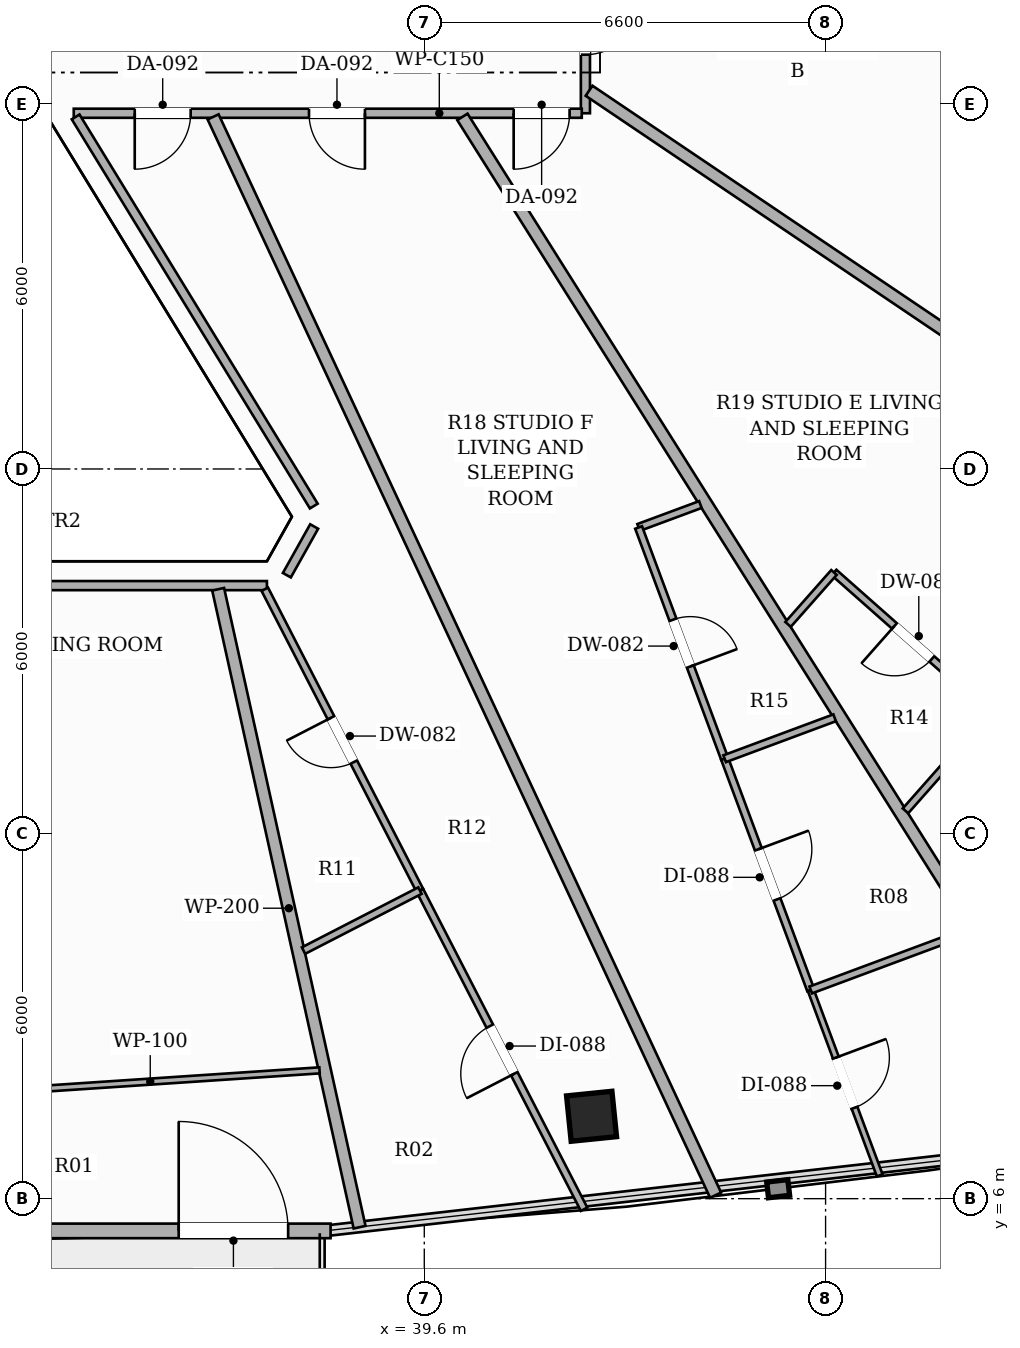
"""IFC4 building model, lengths in metres.
Left out: names, types, materials, properties, quantities, classifications, styles, units other than length and angle.
Written with IfcOpenShell. Run it as: python <this file> out.ifc"""

import sys

from ifc_helpers import new_model, si_unit, direction, frame, frame_2d, origin, origin_2d, place, context, subcontext, project, spatial, rectangle, hollow_rectangle, extrude, element, fill, save


model = new_model("IFC4")
c1 = context("Model", 3, precision=1e-05, world=origin(), true_north=direction((0.0, 1.0)))
c2 = subcontext(c1, "Body", "Model", "MODEL_VIEW")
j1 = project(units=[si_unit("LENGTHUNIT", "METRE"), si_unit("PLANEANGLEUNIT", "RADIAN")], contexts=[c1])
p1 = place(None, origin())
s1 = spatial("IfcSite", under=j1, at=p1, CompositionType="ELEMENT")
p2 = place(p1, origin())
s2 = spatial("IfcBuilding", under=s1, at=p2, CompositionType="ELEMENT")
p3 = place(p2, frame((0.0, 0.0, 253.55)))
s3 = spatial("IfcBuildingStorey", under=s2, at=p3, CompositionType="ELEMENT", Elevation=253.55)
p4 = place(p3, frame((42.351, 7.355, 0.0), z_axis=(0.0, 0.0, 1.0), x_axis=(0.994880708829, 0.101056297183, 0.0)))
e1 = element("IfcColumn", 1, at=p4, inside=s3, PredefinedType="COLUMN", context=c2, shape_type="SweptSolid", body=[
    extrude(hollow_rectangle(XDim=0.75, YDim=0.75, WallThickness=0.025, at=origin_2d()), origin(), (0.0, 0.0, 1.0), 3.3),
])
p5 = place(p3, frame((27.941, 5.47, 0.0), z_axis=(0.0, 0.0, 1.0), x_axis=(1.0, 0.0, 0.0)))
e2 = element("IfcWall", 2, at=p5, inside=s3, PredefinedType="SOLIDWALL", context=c2, shape_type="SweptSolid", body=[
    extrude(rectangle(XDim=10.118, YDim=0.24, at=frame_2d((5.059, 0.0))), origin(), (0.0, 0.0, 1.0), 2.464),
])
p6 = place(p5, frame((7.62, 0.0, 0.0)))
e3 = element("IfcOpeningElement", 3, at=p6, cuts=e2, PredefinedType="OPENING", context=c2, shape_type="SweptSolid", body=[
    extrude(rectangle(XDim=1.8, YDim=2.2, at=frame_2d((0.9, 1.1))), frame((0.0, 0.13, 0.0), z_axis=(0.0, -1.0, 0.0), x_axis=(1.0, 0.0, 0.0)), (0.0, 0.0, 1.0), 0.26),
])
p7 = place(p3, frame((49.146, 24.147, 0.0), z_axis=(0.0, 0.0, 1.0), x_axis=(-0.514275407092, 0.857625096216, 0.0)))
e4 = element("IfcWall", 4, at=p7, inside=s3, PredefinedType="SOLIDWALL", context=c2, shape_type="SweptSolid", body=[
    extrude(rectangle(XDim=9.777, YDim=0.24, at=frame_2d((4.889, 0.0))), origin(), (0.0, 0.0, 1.0), 2.464),
])
p8 = place(p7, frame((7.279, 0.0, 0.0)))
e5 = element("IfcOpeningElement", 5, at=p8, cuts=e4, PredefinedType="OPENING", context=c2, shape_type="SweptSolid", body=[
    extrude(rectangle(XDim=1.8, YDim=2.2, at=frame_2d((0.9, 1.1))), frame((0.0, 0.13, 0.0), z_axis=(0.0, -1.0, 0.0), x_axis=(1.0, 0.0, 0.0)), (0.0, 0.0, 1.0), 0.26),
])
p9 = place(p3, frame((42.25, 26.59, 0.0), z_axis=(0.0, 0.0, 1.0), x_axis=(0.0, -1.0, 0.0)))
e6 = element("IfcWall", 6, at=p9, inside=s3, PredefinedType="PARTITIONING", context=c2, shape_type="SweptSolid", body=[
    extrude(rectangle(XDim=2.74, YDim=0.15, at=frame_2d((1.37, 0.0))), origin(), (0.0, 0.0, 1.0), 2.613),
])
p10 = place(p9, frame((0.897, 0.0, 0.0)))
e7 = element("IfcOpeningElement", 7, at=p10, cuts=e6, PredefinedType="OPENING", context=c2, shape_type="SweptSolid", body=[
    extrude(rectangle(XDim=0.88, YDim=2.1, at=frame_2d((0.44, 1.05))), frame((0.0, 0.085, 0.0), z_axis=(0.0, -1.0, 0.0), x_axis=(1.0, 0.0, 0.0)), (0.0, 0.0, 1.0), 0.17),
])
p11 = place(p3, frame((42.19, 23.85, 0.0), z_axis=(0.0, 0.0, 1.0), x_axis=(-1.0, 0.0, 0.0)))
e8 = element("IfcWall", 8, at=p11, inside=s3, PredefinedType="PARTITIONING", context=c2, shape_type="SweptSolid", body=[
    extrude(rectangle(XDim=8.355, YDim=0.15, at=frame_2d((4.177, 0.0))), origin(), (0.0, 0.0, 1.0), 2.405),
])
p12 = place(p11, frame((0.2, 0.0, 0.0)))
e9 = element("IfcOpeningElement", 9, at=p12, cuts=e8, PredefinedType="OPENING", context=c2, shape_type="SweptSolid", body=[
    extrude(rectangle(XDim=0.92, YDim=2.15, at=frame_2d((0.46, 1.075))), frame((0.0, 0.085, 0.0), z_axis=(0.0, -1.0, 0.0), x_axis=(1.0, 0.0, 0.0)), (0.0, 0.0, 1.0), 0.17),
])
p13 = place(p11, frame((3.566, 0.0, 0.0)))
e10 = element("IfcOpeningElement", 10, at=p13, cuts=e8, PredefinedType="OPENING", context=c2, shape_type="SweptSolid", body=[
    extrude(rectangle(XDim=0.92, YDim=2.15, at=frame_2d((0.46, 1.075))), frame((0.0, 0.085, 0.0), z_axis=(0.0, -1.0, 0.0), x_axis=(1.0, 0.0, 0.0)), (0.0, 0.0, 1.0), 0.17),
])
p14 = place(p11, frame((6.432, 0.0, 0.0)))
e11 = element("IfcOpeningElement", 11, at=p14, cuts=e8, PredefinedType="OPENING", context=c2, shape_type="SweptSolid", body=[
    extrude(rectangle(XDim=0.92, YDim=2.15, at=frame_2d((0.46, 1.075))), frame((0.0, 0.085, 0.0), z_axis=(0.0, -1.0, 0.0), x_axis=(1.0, 0.0, 0.0)), (0.0, 0.0, 1.0), 0.17),
])
p15 = place(p3, frame((33.866, 23.79, 0.0), z_axis=(0.0, 0.0, 1.0), x_axis=(0.522011859837, -0.852938226479, 0.0)))
e12 = element("IfcWall", 12, at=p15, inside=s3, PredefinedType="PARTITIONING", context=c2, shape_type="SweptSolid", body=[
    extrude(rectangle(XDim=7.504, YDim=0.15, at=frame_2d((3.752, 0.0))), origin(), (0.0, 0.0, 1.0), 2.613),
])
p16 = place(p3, frame((37.789, 17.054, 0.0), z_axis=(0.0, 0.0, 1.0), x_axis=(-0.488935266506, -0.872320070368, 0.0)))
e13 = element("IfcWall", 13, at=p16, inside=s3, PredefinedType="PARTITIONING", context=c2, shape_type="SweptSolid", body=[
    extrude(rectangle(XDim=0.918, YDim=0.15, at=frame_2d((0.459, 0.0))), origin(), (0.0, 0.0, 1.0), 2.9),
])
p17 = place(p3, frame((37.012, 16.082, 0.0), z_axis=(0.0, 0.0, 1.0), x_axis=(-1.0, 0.0, 0.0)))
e14 = element("IfcWall", 14, at=p17, inside=s3, PredefinedType="PARTITIONING", context=c2, shape_type="SweptSolid", body=[
    extrude(rectangle(XDim=8.024, YDim=0.15, at=frame_2d((4.012, 0.0))), origin(), (0.0, 0.0, 1.0), 2.613),
])
p18 = place(p3, frame((36.21, 16.022, 0.0), z_axis=(0.0, 0.0, 1.0), x_axis=(0.216451711791, -0.976293325012, 0.0)))
e15 = element("IfcWall", 15, at=p18, inside=s3, PredefinedType="PARTITIONING", context=c2, shape_type="SweptSolid", body=[
    extrude(rectangle(XDim=10.746, YDim=0.2, at=frame_2d((5.373, 0.0))), origin(), (0.0, 0.0, 1.0), 2.332),
])
p19 = place(p3, frame((52.284, 17.493, 0.0), z_axis=(0.0, 0.0, 1.0), x_axis=(-0.829053532208, 0.559169241584, 0.0)))
e16 = element("IfcWall", 16, at=p19, inside=s3, PredefinedType="PARTITIONING", context=c2, shape_type="SweptSolid", body=[
    extrude(rectangle(XDim=12.031, YDim=0.2, at=frame_2d((6.015, 0.0))), origin(), (0.0, 0.0, 1.0), 2.332),
])
p20 = place(p3, frame((50.863, 6.899, 0.0), z_axis=(0.0, 0.0, 1.0), x_axis=(-0.532843438342, 0.846213844259, 0.0)))
e17 = element("IfcWall", 17, at=p20, inside=s3, PredefinedType="PARTITIONING", context=c2, shape_type="SweptSolid", body=[
    extrude(rectangle(XDim=19.961, YDim=0.2, at=frame_2d((9.98, 0.0))), origin(), (0.0, 0.0, 1.0), 2.332),
])
p21 = place(p3, frame((44.391, 6.058, 0.0), z_axis=(0.0, 0.0, 1.0), x_axis=(-0.422434507673, 0.906393450289, 0.0)))
e18 = element("IfcWall", 18, at=p21, inside=s3, PredefinedType="PARTITIONING", context=c2, shape_type="SweptSolid", body=[
    extrude(rectangle(XDim=19.563, YDim=0.2, at=frame_2d((9.782, 0.0))), origin(), (0.0, 0.0, 1.0), 2.332),
])
p22 = place(p3, frame((37.877, 8.11, 0.0), z_axis=(0.0, 0.0, 1.0), x_axis=(-0.997794804299, -0.066374155471, 0.0)))
e19 = element("IfcWall", 19, at=p22, inside=s3, PredefinedType="PARTITIONING", context=c2, shape_type="SweptSolid", body=[
    extrude(rectangle(XDim=10.851, YDim=0.1, at=frame_2d((5.425, 0.0))), origin(), (0.0, 0.0, 1.0), 2.332),
])
p23 = place(p22, frame((5.68, 0.0, 0.0)))
e20 = element("IfcOpeningElement", 20, at=p23, cuts=e19, PredefinedType="OPENING", context=c2, shape_type="SweptSolid", body=[
    extrude(rectangle(XDim=0.88, YDim=2.1, at=frame_2d((0.44, 1.05))), frame((0.0, 0.06, 0.0), z_axis=(0.0, -1.0, 0.0), x_axis=(1.0, 0.0, 0.0)), (0.0, 0.0, 1.0), 0.12),
])
p24 = place(p3, frame((48.943, 13.995, 0.0), z_axis=(0.0, 0.0, 1.0), x_axis=(-0.749231040751, 0.662308725275, 0.0)))
e21 = element("IfcWall", 21, at=p24, inside=s3, PredefinedType="PARTITIONING", context=c2, shape_type="SweptSolid", body=[
    extrude(rectangle(XDim=3.477, YDim=0.12, at=frame_2d((1.739, 0.0))), origin(), (0.0, 0.0, 1.0), 2.405),
])
p25 = place(p24, frame((1.329, 0.0, 0.0)))
e22 = element("IfcOpeningElement", 22, at=p25, cuts=e21, PredefinedType="OPENING", context=c2, shape_type="SweptSolid", body=[
    extrude(rectangle(XDim=0.82, YDim=2.1, at=frame_2d((0.41, 1.05))), frame((0.0, 0.07, 0.0), z_axis=(0.0, -1.0, 0.0), x_axis=(1.0, 0.0, 0.0)), (0.0, 0.0, 1.0), 0.14),
])
p26 = place(p3, frame((46.338, 16.298, 0.0), z_axis=(0.0, 0.0, 1.0), x_axis=(-0.662287293934, -0.749249985181, 0.0)))
e23 = element("IfcWall", 23, at=p26, inside=s3, PredefinedType="PARTITIONING", context=c2, shape_type="SweptSolid", body=[
    extrude(rectangle(XDim=1.14, YDim=0.12, at=frame_2d((0.57, 0.0))), origin(), (0.0, 0.0, 1.0), 2.9),
])
p27 = place(p3, frame((48.943, 13.995, 0.0), z_axis=(0.0, 0.0, 1.0), x_axis=(-0.662212567735, -0.749316031547, 0.0)))
e24 = element("IfcWall", 24, at=p27, inside=s3, PredefinedType="PARTITIONING", context=c2, shape_type="SweptSolid", body=[
    extrude(rectangle(XDim=2.158, YDim=0.12, at=frame_2d((1.079, 0.0))), origin(), (0.0, 0.0, 1.0), 2.405),
])
p28 = place(p3, frame((44.141, 17.415, 0.0), z_axis=(0.0, 0.0, 1.0), x_axis=(-0.937563848777, -0.347813210599, 0.0)))
e25 = element("IfcWall", 25, at=p28, inside=s3, PredefinedType="PARTITIONING", context=c2, shape_type="SweptSolid", body=[
    extrude(rectangle(XDim=1.084, YDim=0.12, at=frame_2d((0.542, 0.0))), origin(), (0.0, 0.0, 1.0), 2.613),
])
p29 = place(p3, frame((43.125, 17.038, 0.0), z_axis=(0.0, 0.0, 1.0), x_axis=(0.348728795746, -0.937223680355, 0.0)))
e26 = element("IfcWall", 26, at=p29, inside=s3, PredefinedType="PARTITIONING", context=c2, shape_type="SweptSolid", body=[
    extrude(rectangle(XDim=4.058, YDim=0.12, at=frame_2d((2.029, 0.0))), origin(), (0.0, 0.0, 1.0), 2.613),
])
p30 = place(p29, frame((1.619, 0.0, 0.0)))
e27 = element("IfcOpeningElement", 27, at=p30, cuts=e26, PredefinedType="OPENING", context=c2, shape_type="SweptSolid", body=[
    extrude(rectangle(XDim=0.82, YDim=2.1, at=frame_2d((0.41, 1.05))), frame((0.0, 0.07, 0.0), z_axis=(0.0, -1.0, 0.0), x_axis=(1.0, 0.0, 0.0)), (0.0, 0.0, 1.0), 0.14),
])
p31 = place(p3, frame((44.54, 13.235, 0.0), z_axis=(0.0, 0.0, 1.0), x_axis=(0.348709131935, -0.937230996769, 0.0)))
e28 = element("IfcWall", 28, at=p31, inside=s3, PredefinedType="PARTITIONING", context=c2, shape_type="SweptSolid", body=[
    extrude(rectangle(XDim=4.058, YDim=0.12, at=frame_2d((2.029, 0.0))), origin(), (0.0, 0.0, 1.0), 2.9),
])
p32 = place(p31, frame((1.589, 0.0, 0.0)))
e29 = element("IfcOpeningElement", 29, at=p32, cuts=e28, PredefinedType="OPENING", context=c2, shape_type="SweptSolid", body=[
    extrude(rectangle(XDim=0.88, YDim=2.1, at=frame_2d((0.44, 1.05))), frame((0.0, 0.07, 0.0), z_axis=(0.0, -1.0, 0.0), x_axis=(1.0, 0.0, 0.0)), (0.0, 0.0, 1.0), 0.14),
])
p33 = place(p3, frame((45.955, 9.432, 0.0), z_axis=(0.0, 0.0, 1.0), x_axis=(0.34888547359, -0.937165367647, 0.0)))
e30 = element("IfcWall", 30, at=p33, inside=s3, PredefinedType="PARTITIONING", context=c2, shape_type="SweptSolid", body=[
    extrude(rectangle(XDim=3.253, YDim=0.1, at=frame_2d((1.626, 0.0))), origin(), (0.0, 0.0, 1.0), 2.332),
])
p34 = place(p33, frame((1.187, 0.0, 0.0)))
e31 = element("IfcOpeningElement", 31, at=p34, cuts=e30, PredefinedType="OPENING", context=c2, shape_type="SweptSolid", body=[
    extrude(rectangle(XDim=0.88, YDim=2.1, at=frame_2d((0.44, 1.05))), frame((0.0, 0.06, 0.0), z_axis=(0.0, -1.0, 0.0), x_axis=(1.0, 0.0, 0.0)), (0.0, 0.0, 1.0), 0.12),
])
p35 = place(p3, frame((46.349, 13.908, 0.0), z_axis=(0.0, 0.0, 1.0), x_axis=(-0.937271835507, -0.348599349347, 0.0)))
e32 = element("IfcWall", 32, at=p35, inside=s3, PredefinedType="PARTITIONING", context=c2, shape_type="SweptSolid", body=[
    extrude(rectangle(XDim=1.93, YDim=0.12, at=frame_2d((0.965, 0.0))), origin(), (0.0, 0.0, 1.0), 2.613),
])
p36 = place(p3, frame((48.558, 10.4, 0.0), z_axis=(0.0, 0.0, 1.0), x_axis=(-0.937286649549, -0.34855951655, 0.0)))
e33 = element("IfcWall", 33, at=p36, inside=s3, PredefinedType="PARTITIONING", context=c2, shape_type="SweptSolid", body=[
    extrude(rectangle(XDim=2.777, YDim=0.12, at=frame_2d((1.389, 0.0))), origin(), (0.0, 0.0, 1.0), 2.613),
])
p37 = place(p3, frame((39.529, 11.066, 0.0), z_axis=(0.0, 0.0, 1.0), x_axis=(-0.457798211716, 0.889056127221, 0.0)))
e34 = element("IfcWall", 34, at=p37, inside=s3, PredefinedType="PARTITIONING", context=c2, shape_type="SweptSolid", body=[
    extrude(rectangle(XDim=5.574, YDim=0.12, at=frame_2d((2.787, 0.0))), origin(), (0.0, 0.0, 1.0), 2.613),
])
p38 = place(p37, frame((2.377, 0.0, 0.0)))
e35 = element("IfcOpeningElement", 35, at=p38, cuts=e34, PredefinedType="OPENING", context=c2, shape_type="SweptSolid", body=[
    extrude(rectangle(XDim=0.82, YDim=2.1, at=frame_2d((0.41, 1.05))), frame((0.0, 0.07, 0.0), z_axis=(0.0, -1.0, 0.0), x_axis=(1.0, 0.0, 0.0)), (0.0, 0.0, 1.0), 0.14),
])
p39 = place(p3, frame((42.228, 5.826, 0.0), z_axis=(0.0, 0.0, 1.0), x_axis=(-0.457901041138, 0.889003170143, 0.0)))
e36 = element("IfcWall", 36, at=p39, inside=s3, PredefinedType="PARTITIONING", context=c2, shape_type="SweptSolid", body=[
    extrude(rectangle(XDim=5.894, YDim=0.12, at=frame_2d((2.947, 0.0))), origin(), (0.0, 0.0, 1.0), 2.332),
])
p40 = place(p39, frame((2.507, 0.0, 0.0)))
e37 = element("IfcOpeningElement", 37, at=p40, cuts=e36, PredefinedType="OPENING", context=c2, shape_type="SweptSolid", body=[
    extrude(rectangle(XDim=0.88, YDim=2.1, at=frame_2d((0.44, 1.05))), frame((0.0, 0.07, 0.0), z_axis=(0.0, -1.0, 0.0), x_axis=(1.0, 0.0, 0.0)), (0.0, 0.0, 1.0), 0.14),
])
p41 = place(p3, frame((39.529, 11.066, 0.0), z_axis=(0.0, 0.0, 1.0), x_axis=(-0.889105964634, -0.457701413207, 0.0)))
e38 = element("IfcWall", 38, at=p41, inside=s3, PredefinedType="PARTITIONING", context=c2, shape_type="SweptSolid", body=[
    extrude(rectangle(XDim=2.154, YDim=0.12, at=frame_2d((1.077, 0.0))), origin(), (0.0, 0.0, 1.0), 2.613),
])
p42 = place(p6, origin())
e39 = element("IfcDoor", 39, at=p42, inside=s3, OperationType="SINGLE_SWING_LEFT", PredefinedType="DOOR", context=c2, shape_type="SweptSolid", body=[
    extrude(rectangle(XDim=1.8, YDim=2.2, at=frame_2d((0.9, 1.1))), frame((0.0, 0.025, 0.0), z_axis=(0.0, -1.0, 0.0), x_axis=(1.0, 0.0, 0.0)), (0.0, 0.0, 1.0), 0.05),
])
fill(e3, e39)
p43 = place(p10, origin())
e40 = element("IfcDoor", 40, at=p43, inside=s3, OperationType="SINGLE_SWING_LEFT", PredefinedType="DOOR", context=c2, shape_type="SweptSolid", body=[
    extrude(rectangle(XDim=0.88, YDim=2.1, at=frame_2d((0.44, 1.05))), frame((0.0, 0.025, 0.0), z_axis=(0.0, -1.0, 0.0), x_axis=(1.0, 0.0, 0.0)), (0.0, 0.0, 1.0), 0.05),
])
fill(e7, e40)
p44 = place(p12, origin())
e41 = element("IfcDoor", 41, at=p44, inside=s3, OperationType="SINGLE_SWING_RIGHT", PredefinedType="DOOR", context=c2, shape_type="SweptSolid", body=[
    extrude(rectangle(XDim=0.92, YDim=2.15, at=frame_2d((0.46, 1.075))), frame((0.0, 0.025, 0.0), z_axis=(0.0, -1.0, 0.0), x_axis=(1.0, 0.0, 0.0)), (0.0, 0.0, 1.0), 0.05),
])
fill(e9, e41)
p45 = place(p25, origin())
e42 = element("IfcDoor", 42, at=p45, inside=s3, OperationType="SINGLE_SWING_RIGHT", PredefinedType="DOOR", context=c2, shape_type="SweptSolid", body=[
    extrude(rectangle(XDim=0.82, YDim=2.1, at=frame_2d((0.41, 1.05))), frame((0.0, 0.025, 0.0), z_axis=(0.0, -1.0, 0.0), x_axis=(1.0, 0.0, 0.0)), (0.0, 0.0, 1.0), 0.05),
])
fill(e22, e42)
p46 = place(p13, origin())
e43 = element("IfcDoor", 43, at=p46, inside=s3, OperationType="SINGLE_SWING_LEFT", PredefinedType="DOOR", context=c2, shape_type="SweptSolid", body=[
    extrude(rectangle(XDim=0.92, YDim=2.15, at=frame_2d((0.46, 1.075))), frame((0.0, 0.025, 0.0), z_axis=(0.0, -1.0, 0.0), x_axis=(1.0, 0.0, 0.0)), (0.0, 0.0, 1.0), 0.05),
])
fill(e10, e43)
p47 = place(p30, origin())
e44 = element("IfcDoor", 44, at=p47, inside=s3, OperationType="SINGLE_SWING_RIGHT", PredefinedType="DOOR", context=c2, shape_type="SweptSolid", body=[
    extrude(rectangle(XDim=0.82, YDim=2.1, at=frame_2d((0.41, 1.05))), frame((0.0, 0.025, 0.0), z_axis=(0.0, -1.0, 0.0), x_axis=(1.0, 0.0, 0.0)), (0.0, 0.0, 1.0), 0.05),
])
fill(e27, e44)
p48 = place(p32, origin())
e45 = element("IfcDoor", 45, at=p48, inside=s3, OperationType="SINGLE_SWING_LEFT", PredefinedType="DOOR", context=c2, shape_type="SweptSolid", body=[
    extrude(rectangle(XDim=0.88, YDim=2.1, at=frame_2d((0.44, 1.05))), frame((0.0, 0.025, 0.0), z_axis=(0.0, -1.0, 0.0), x_axis=(1.0, 0.0, 0.0)), (0.0, 0.0, 1.0), 0.05),
])
fill(e29, e45)
p49 = place(p34, origin())
e46 = element("IfcDoor", 46, at=p49, inside=s3, OperationType="SINGLE_SWING_LEFT", PredefinedType="DOOR", context=c2, shape_type="SweptSolid", body=[
    extrude(rectangle(XDim=0.88, YDim=2.1, at=frame_2d((0.44, 1.05))), frame((0.0, 0.025, 0.0), z_axis=(0.0, -1.0, 0.0), x_axis=(1.0, 0.0, 0.0)), (0.0, 0.0, 1.0), 0.05),
])
fill(e31, e46)
p50 = place(p14, origin())
e47 = element("IfcDoor", 47, at=p50, inside=s3, OperationType="SINGLE_SWING_RIGHT", PredefinedType="DOOR", context=c2, shape_type="SweptSolid", body=[
    extrude(rectangle(XDim=0.92, YDim=2.15, at=frame_2d((0.46, 1.075))), frame((0.0, 0.025, 0.0), z_axis=(0.0, -1.0, 0.0), x_axis=(1.0, 0.0, 0.0)), (0.0, 0.0, 1.0), 0.05),
])
fill(e11, e47)
p51 = place(p38, origin())
e48 = element("IfcDoor", 48, at=p51, inside=s3, OperationType="SINGLE_SWING_RIGHT", PredefinedType="DOOR", context=c2, shape_type="SweptSolid", body=[
    extrude(rectangle(XDim=0.82, YDim=2.1, at=frame_2d((0.41, 1.05))), frame((0.0, 0.025, 0.0), z_axis=(0.0, -1.0, 0.0), x_axis=(1.0, 0.0, 0.0)), (0.0, 0.0, 1.0), 0.05),
])
fill(e35, e48)
p52 = place(p40, origin())
e49 = element("IfcDoor", 49, at=p52, inside=s3, OperationType="SINGLE_SWING_LEFT", PredefinedType="DOOR", context=c2, shape_type="SweptSolid", body=[
    extrude(rectangle(XDim=0.88, YDim=2.1, at=frame_2d((0.44, 1.05))), frame((0.0, 0.025, 0.0), z_axis=(0.0, -1.0, 0.0), x_axis=(1.0, 0.0, 0.0)), (0.0, 0.0, 1.0), 0.05),
])
fill(e37, e49)
save(model, sys.argv[1])
